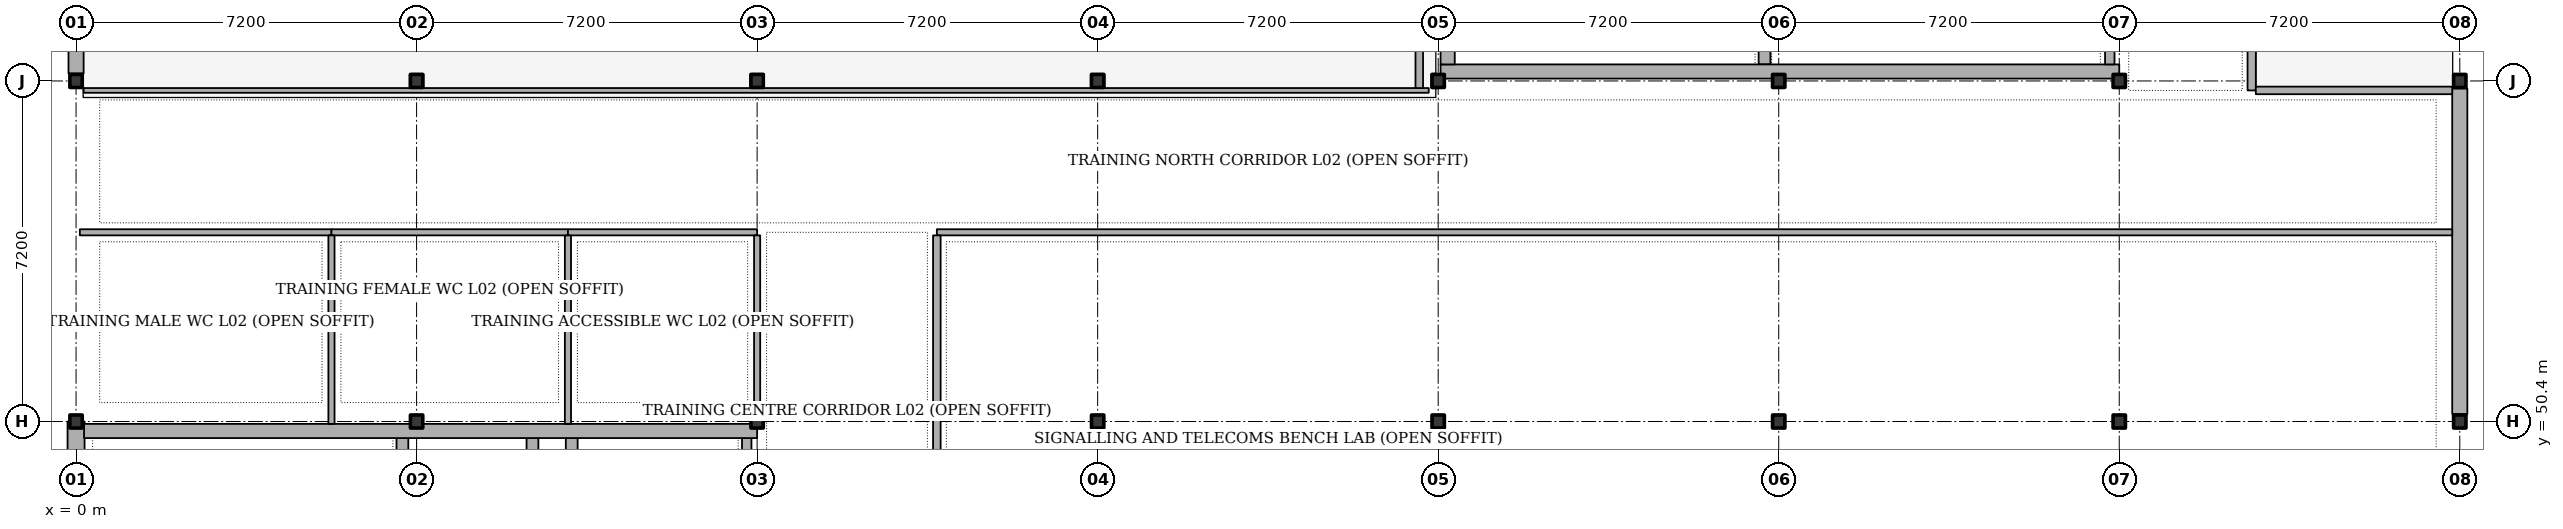
"""IFC4 building model, lengths in metres.
Left out: names, types, materials, properties, quantities, classifications, styles, units other than length and angle.
Written with IfcOpenShell. Run it as: python <this file> out.ifc"""

import sys

from ifc_helpers import new_model, si_unit, direction, frame, frame_2d, origin, origin_2d, place, context, subcontext, project, spatial, rectangle, i_section, extrude, element, fill, save


model = new_model("IFC4")
c1 = context("Model", 3, precision=1e-05, world=origin(), true_north=direction((0.0, 1.0)))
c2 = subcontext(c1, "Body", "Model", "MODEL_VIEW")
j1 = project(units=[si_unit("LENGTHUNIT", "METRE"), si_unit("PLANEANGLEUNIT", "RADIAN")], contexts=[c1])
p1 = place(None, origin())
s1 = spatial("IfcSite", under=j1, at=p1, CompositionType="ELEMENT")
p2 = place(p1, origin())
s2 = spatial("IfcBuilding", under=s1, at=p2, CompositionType="ELEMENT")
p3 = place(p2, frame((0.0, 0.0, 9.9)))
s3 = spatial("IfcBuildingStorey", under=s2, at=p3, CompositionType="ELEMENT", Elevation=9.9)
for number, where, z_axis, x_axis in (
    (1, (0.0, 50.4, 0.0), (0.0, 0.0, 1.0), (1.0, 0.0, 0.0)),
    (2, (0.0, 57.6, 0.0), (0.0, 0.0, 1.0), (1.0, 0.0, 0.0)),
    (3, (7.2, 50.4, 0.0), (0.0, 0.0, 1.0), (1.0, 0.0, 0.0)),
    (4, (7.2, 57.6, 0.0), (0.0, 0.0, 1.0), (1.0, 0.0, 0.0)),
    (5, (14.4, 50.4, 0.0), (0.0, 0.0, 1.0), (1.0, 0.0, 0.0)),
    (6, (14.4, 57.6, 0.0), (0.0, 0.0, 1.0), (1.0, 0.0, 0.0)),
    (7, (21.6, 50.4, 0.0), (0.0, 0.0, 1.0), (1.0, 0.0, 0.0)),
    (8, (21.6, 57.6, 0.0), (0.0, 0.0, 1.0), (1.0, 0.0, 0.0)),
    (9, (28.8, 50.4, 0.0), (0.0, 0.0, 1.0), (1.0, 0.0, 0.0)),
    (10, (28.8, 57.6, 0.0), (0.0, 0.0, 1.0), (1.0, 0.0, 0.0)),
    (11, (36.0, 50.4, 0.0), (0.0, 0.0, 1.0), (1.0, 0.0, 0.0)),
    (12, (36.0, 57.6, 0.0), (0.0, 0.0, 1.0), (1.0, 0.0, 0.0)),
    (13, (43.2, 50.4, 0.0), (0.0, 0.0, 1.0), (1.0, 0.0, 0.0)),
    (14, (43.2, 57.6, 0.0), (0.0, 0.0, 1.0), (1.0, 0.0, 0.0)),
    (15, (50.4, 50.4, 0.0), (0.0, 0.0, 1.0), (1.0, 0.0, 0.0)),
    (16, (50.4, 57.6, 0.0), (0.0, 0.0, 1.0), (1.0, 0.0, 0.0)),
):
    element("IfcColumn", number, at=place(p3, frame(where, z_axis=z_axis, x_axis=x_axis)), inside=s3, PredefinedType="COLUMN", context=c2, shape_type="SweptSolid", body=[
        extrude(i_section(OverallWidth=0.261, OverallDepth=0.276, WebThickness=0.015, FlangeThickness=0.025, FilletRadius=0.013, at=origin_2d()), origin(), (0.0, 0.0, 1.0), 4.5),
    ])
p4 = place(p3, frame((0.0, 43.2, 0.0), z_axis=(0.0, 0.0, 1.0), x_axis=(0.0, 1.0, 0.0)))
e17 = element("IfcWall", 17, at=p4, inside=s3, PredefinedType="SHEAR", context=c2, shape_type="SweptSolid", body=[
    extrude(rectangle(XDim=7.2, YDim=0.36, at=frame_2d((3.6, 0.0))), origin(), (0.0, 0.0, 1.0), 3.8),
])
p5 = place(p3, frame((0.0, 57.758, 0.0), z_axis=(0.0, 0.0, 1.0), x_axis=(0.0, 1.0, 0.0)))
e18 = element("IfcWall", 18, at=p5, inside=s3, PredefinedType="SOLIDWALL", context=c2, shape_type="SweptSolid", body=[
    extrude(rectangle(XDim=6.884, YDim=0.32, at=frame_2d((3.442, 0.0))), origin(), (0.0, 0.0, 1.0), 3.8),
])
p6 = place(p5, frame((3.042, 0.0, 1.05)))
e19 = element("IfcOpeningElement", 19, at=p6, cuts=e18, PredefinedType="OPENING", context=c2, shape_type="SweptSolid", body=[
    extrude(rectangle(XDim=0.8, YDim=1.4, at=frame_2d((0.4, 0.7))), frame((0.0, 0.17, 0.0), z_axis=(0.0, -1.0, 0.0), x_axis=(1.0, 0.0, 0.0)), (0.0, 0.0, 1.0), 0.34),
])
p7 = place(p3, frame((50.4, 57.442, 0.0), z_axis=(0.0, 0.0, 1.0), x_axis=(0.0, -1.0, 0.0)))
e20 = element("IfcWall", 20, at=p7, inside=s3, PredefinedType="SOLIDWALL", context=c2, shape_type="SweptSolid", body=[
    extrude(rectangle(XDim=6.884, YDim=0.32, at=frame_2d((3.442, 0.0))), origin(), (0.0, 0.0, 1.0), 3.414),
])
p8 = place(p7, frame((4.058, 0.0, 1.05)))
e21 = element("IfcOpeningElement", 21, at=p8, cuts=e20, PredefinedType="OPENING", context=c2, shape_type="SweptSolid", body=[
    extrude(rectangle(XDim=1.66, YDim=1.8, at=frame_2d((0.83, 0.9))), frame((0.0, 0.17, 0.0), z_axis=(0.0, -1.0, 0.0), x_axis=(1.0, 0.0, 0.0)), (0.0, 0.0, 1.0), 0.34),
])
p9 = place(p3, frame((6.9, 43.55, 0.0), z_axis=(0.0, 0.0, 1.0), x_axis=(0.0, 1.0, 0.0)))
e22 = element("IfcWall", 22, at=p9, inside=s3, PredefinedType="SHEAR", context=c2, shape_type="SweptSolid", body=[
    extrude(rectangle(XDim=6.5, YDim=0.25, at=frame_2d((3.25, 0.0))), origin(), (0.0, 0.0, 1.0), 3.6),
])
p10 = place(p9, frame((0.95, 0.0, 0.0)))
e23 = element("IfcOpeningElement", 23, at=p10, cuts=e22, PredefinedType="OPENING", context=c2, shape_type="SweptSolid", body=[
    extrude(rectangle(XDim=1.35, YDim=2.15, at=frame_2d((0.675, 1.075))), frame((0.0, 0.135, 0.0), z_axis=(0.0, -1.0, 0.0), x_axis=(1.0, 0.0, 0.0)), (0.0, 0.0, 1.0), 0.27),
])
p11 = place(p3, frame((9.65, 47.085, 0.0), z_axis=(0.0, 0.0, 1.0), x_axis=(0.0, 1.0, 0.0)))
e24 = element("IfcWall", 24, at=p11, inside=s3, PredefinedType="SHEAR", context=c2, shape_type="SweptSolid", body=[
    extrude(rectangle(XDim=2.965, YDim=0.25, at=frame_2d((1.482, 0.0))), origin(), (0.0, 0.0, 1.0), 3.6),
])
p12 = place(p3, frame((10.48, 47.085, 0.0), z_axis=(0.0, 0.0, 1.0), x_axis=(0.0, 1.0, 0.0)))
e25 = element("IfcWall", 25, at=p12, inside=s3, PredefinedType="SHEAR", context=c2, shape_type="SweptSolid", body=[
    extrude(rectangle(XDim=2.965, YDim=0.25, at=frame_2d((1.482, 0.0))), origin(), (0.0, 0.0, 1.0), 3.6),
])
p13 = place(p12, frame((0.9, 0.0, 0.0)))
e26 = element("IfcOpeningElement", 26, at=p13, cuts=e25, PredefinedType="OPENING", context=c2, shape_type="SweptSolid", body=[
    extrude(rectangle(XDim=0.92, YDim=2.05, at=frame_2d((0.46, 1.025))), frame((0.0, 0.135, 0.0), z_axis=(0.0, -1.0, 0.0), x_axis=(1.0, 0.0, 0.0)), (0.0, 0.0, 1.0), 0.27),
])
p14 = place(p3, frame((14.18, 43.55, 0.0), z_axis=(0.0, 0.0, 1.0), x_axis=(0.0, 1.0, 0.0)))
e27 = element("IfcWall", 27, at=p14, inside=s3, PredefinedType="SOLIDWALL", context=c2, shape_type="SweptSolid", body=[
    extrude(rectangle(XDim=6.5, YDim=0.2, at=frame_2d((3.25, 0.0))), origin(), (0.0, 0.0, 1.0), 3.6),
])
p15 = place(p14, frame((2.5, 0.0, 0.0)))
e28 = element("IfcOpeningElement", 28, at=p15, cuts=e27, PredefinedType="OPENING", context=c2, shape_type="SweptSolid", body=[
    extrude(rectangle(XDim=1.5, YDim=2.15, at=frame_2d((0.75, 1.075))), frame((0.0, 0.11, 0.0), z_axis=(0.0, -1.0, 0.0), x_axis=(1.0, 0.0, 0.0)), (0.0, 0.0, 1.0), 0.22),
])
p16 = place(p3, frame((0.17, 50.2, 0.0), z_axis=(0.0, 0.0, 1.0), x_axis=(1.0, 0.0, 0.0)))
e29 = element("IfcWall", 29, at=p16, inside=s3, PredefinedType="SHEAR", context=c2, shape_type="SweptSolid", body=[
    extrude(rectangle(XDim=14.23, YDim=0.3, at=frame_2d((7.115, 0.0))), origin(), (0.0, 0.0, 1.0), 3.6),
])
p17 = place(p3, frame((35.7, 57.95, 0.0), z_axis=(0.0, 0.0, 1.0), x_axis=(0.0, 1.0, 0.0)))
e30 = element("IfcWall", 30, at=p17, inside=s3, PredefinedType="SHEAR", context=c2, shape_type="SweptSolid", body=[
    extrude(rectangle(XDim=6.5, YDim=0.25, at=frame_2d((3.25, 0.0))), origin(), (0.0, 0.0, 1.0), 3.6),
])
p18 = place(p17, frame((0.95, 0.0, 0.0)))
e31 = element("IfcOpeningElement", 31, at=p18, cuts=e30, PredefinedType="OPENING", context=c2, shape_type="SweptSolid", body=[
    extrude(rectangle(XDim=1.35, YDim=2.15, at=frame_2d((0.675, 1.075))), frame((0.0, 0.135, 0.0), z_axis=(0.0, -1.0, 0.0), x_axis=(1.0, 0.0, 0.0)), (0.0, 0.0, 1.0), 0.27),
])
p19 = place(p3, frame((28.85, 57.8, 0.0), z_axis=(0.0, 0.0, 1.0), x_axis=(1.0, 0.0, 0.0)))
e32 = element("IfcWall", 32, at=p19, inside=s3, PredefinedType="SHEAR", context=c2, shape_type="SweptSolid", body=[
    extrude(rectangle(XDim=14.35, YDim=0.3, at=frame_2d((7.175, 0.0))), origin(), (0.0, 0.0, 1.0), 3.6),
])
p20 = place(p19, frame((11.5, 0.0, 0.0)))
e33 = element("IfcOpeningElement", 33, at=p20, cuts=e32, PredefinedType="OPENING", context=c2, shape_type="SweptSolid", body=[
    extrude(rectangle(XDim=1.5, YDim=2.15, at=frame_2d((0.75, 1.075))), frame((0.0, 0.16, 0.0), z_axis=(0.0, -1.0, 0.0), x_axis=(1.0, 0.0, 0.0)), (0.0, 0.0, 1.0), 0.32),
])
p21 = place(p3, frame((29.0, 57.95, 0.0), z_axis=(0.0, 0.0, 1.0), x_axis=(0.0, 1.0, 0.0)))
e34 = element("IfcWall", 34, at=p21, inside=s3, PredefinedType="SHEAR", context=c2, shape_type="SweptSolid", body=[
    extrude(rectangle(XDim=6.5, YDim=0.3, at=frame_2d((3.25, 0.0))), origin(), (0.0, 0.0, 1.0), 3.6),
])
p22 = place(p3, frame((43.0, 57.95, 0.0), z_axis=(0.0, 0.0, 1.0), x_axis=(0.0, 1.0, 0.0)))
e35 = element("IfcWall", 35, at=p22, inside=s3, PredefinedType="SOLIDWALL", context=c2, shape_type="SweptSolid", body=[
    extrude(rectangle(XDim=6.5, YDim=0.2, at=frame_2d((3.25, 0.0))), origin(), (0.0, 0.0, 1.0), 3.6),
])
p23 = place(p3, frame((18.2, 54.4, 0.0), z_axis=(0.0, 0.0, 1.0), x_axis=(1.0, 0.0, 0.0)))
e36 = element("IfcWall", 36, at=p23, inside=s3, PredefinedType="PARTITIONING", context=c2, shape_type="SweptSolid", body=[
    extrude(rectangle(XDim=32.04, YDim=0.13, at=frame_2d((16.02, 0.0))), origin(), (0.0, 0.0, 1.0), 3.55),
])
p24 = place(p23, frame((0.32, 0.0, 0.0)))
e37 = element("IfcOpeningElement", 37, at=p24, cuts=e36, PredefinedType="OPENING", context=c2, shape_type="SweptSolid", body=[
    extrude(rectangle(XDim=1.75, YDim=2.25, at=frame_2d((0.875, 1.125))), frame((0.0, 0.075, 0.0), z_axis=(0.0, -1.0, 0.0), x_axis=(1.0, 0.0, 0.0)), (0.0, 0.0, 1.0), 0.15),
])
p25 = place(p3, frame((0.08, 54.4, 0.0), z_axis=(0.0, 0.0, 1.0), x_axis=(1.0, 0.0, 0.0)))
e38 = element("IfcWall", 38, at=p25, inside=s3, PredefinedType="PARTITIONING", context=c2, shape_type="SweptSolid", body=[
    extrude(rectangle(XDim=5.32, YDim=0.13, at=frame_2d((2.66, 0.0))), origin(), (0.0, 0.0, 1.0), 3.55),
])
p26 = place(p25, frame((3.21, 0.0, 0.0)))
e39 = element("IfcOpeningElement", 39, at=p26, cuts=e38, PredefinedType="OPENING", context=c2, shape_type="SweptSolid", body=[
    extrude(rectangle(XDim=0.9, YDim=2.05, at=frame_2d((0.45, 1.025))), frame((0.0, 0.075, 0.0), z_axis=(0.0, -1.0, 0.0), x_axis=(1.0, 0.0, 0.0)), (0.0, 0.0, 1.0), 0.15),
])
p27 = place(p3, frame((5.4, 54.4, 0.0), z_axis=(0.0, 0.0, 1.0), x_axis=(1.0, 0.0, 0.0)))
e40 = element("IfcWall", 40, at=p27, inside=s3, PredefinedType="PARTITIONING", context=c2, shape_type="SweptSolid", body=[
    extrude(rectangle(XDim=5.0, YDim=0.13, at=frame_2d((2.5, 0.0))), origin(), (0.0, 0.0, 1.0), 3.55),
])
p28 = place(p27, frame((3.78, 0.0, 0.0)))
e41 = element("IfcOpeningElement", 41, at=p28, cuts=e40, PredefinedType="OPENING", context=c2, shape_type="SweptSolid", body=[
    extrude(rectangle(XDim=0.9, YDim=2.05, at=frame_2d((0.45, 1.025))), frame((0.0, 0.075, 0.0), z_axis=(0.0, -1.0, 0.0), x_axis=(1.0, 0.0, 0.0)), (0.0, 0.0, 1.0), 0.15),
])
p29 = place(p3, frame((10.4, 54.4, 0.0), z_axis=(0.0, 0.0, 1.0), x_axis=(1.0, 0.0, 0.0)))
e42 = element("IfcWall", 42, at=p29, inside=s3, PredefinedType="PARTITIONING", context=c2, shape_type="SweptSolid", body=[
    extrude(rectangle(XDim=4.0, YDim=0.13, at=frame_2d((2.0, 0.0))), origin(), (0.0, 0.0, 1.0), 3.55),
])
p30 = place(p29, frame((0.32, 0.0, 0.0)))
e43 = element("IfcOpeningElement", 43, at=p30, cuts=e42, PredefinedType="OPENING", context=c2, shape_type="SweptSolid", body=[
    extrude(rectangle(XDim=0.98, YDim=2.1, at=frame_2d((0.49, 1.05))), frame((0.0, 0.075, 0.0), z_axis=(0.0, -1.0, 0.0), x_axis=(1.0, 0.0, 0.0)), (0.0, 0.0, 1.0), 0.15),
])
p31 = place(p3, frame((0.16, 57.4, 0.0), z_axis=(0.0, 0.0, 1.0), x_axis=(1.0, 0.0, 0.0)))
e44 = element("IfcWall", 44, at=p31, inside=s3, PredefinedType="PARTITIONING", context=c2, shape_type="SweptSolid", body=[
    extrude(rectangle(XDim=28.44, YDim=0.1, at=frame_2d((14.22, 0.0))), origin(), (0.0, 0.0, 1.0), 3.55),
])
p32 = place(p31, frame((16.947, 0.0, 0.0)))
e45 = element("IfcOpeningElement", 45, at=p32, cuts=e44, PredefinedType="OPENING", context=c2, shape_type="SweptSolid", body=[
    extrude(rectangle(XDim=1.28, YDim=2.18, at=frame_2d((0.64, 1.09))), frame((0.0, 0.06, 0.0), z_axis=(0.0, -1.0, 0.0), x_axis=(1.0, 0.0, 0.0)), (0.0, 0.0, 1.0), 0.12),
])
p33 = place(p3, frame((46.0, 57.4, 0.0), z_axis=(0.0, 0.0, 1.0), x_axis=(0.0, 1.0, 0.0)))
e46 = element("IfcWall", 46, at=p33, inside=s3, PredefinedType="PARTITIONING", context=c2, shape_type="SweptSolid", body=[
    extrude(rectangle(XDim=14.44, YDim=0.175, at=frame_2d((7.22, 0.0))), origin(), (0.0, 0.0, 1.0), 3.55),
])
p34 = place(p33, frame((3.275, 0.0, 0.0)))
e47 = element("IfcOpeningElement", 47, at=p34, cuts=e46, PredefinedType="OPENING", context=c2, shape_type="SweptSolid", body=[
    extrude(rectangle(XDim=1.05, YDim=2.15, at=frame_2d((0.525, 1.075))), frame((0.0, 0.097, 0.0), z_axis=(0.0, -1.0, 0.0), x_axis=(1.0, 0.0, 0.0)), (0.0, 0.0, 1.0), 0.195),
])
p35 = place(p3, frame((18.2, 38.28, 0.0), z_axis=(0.0, 0.0, 1.0), x_axis=(0.0, 1.0, 0.0)))
e48 = element("IfcWall", 48, at=p35, inside=s3, PredefinedType="PARTITIONING", context=c2, shape_type="SweptSolid", body=[
    extrude(rectangle(XDim=16.055, YDim=0.16, at=frame_2d((8.027, 0.0))), origin(), (0.0, 0.0, 1.0), 3.55),
])
for number, where, z_axis, x_axis in (
    (49, (5.4, 50.35, 0.0), (0.0, 0.0, 1.0), (0.0, 1.0, 0.0)),
    (50, (10.4, 50.35, 0.0), (0.0, 0.0, 1.0), (0.0, 1.0, 0.0)),
):
    element("IfcWall", number, at=place(p3, frame(where, z_axis=z_axis, x_axis=x_axis)), inside=s3, PredefinedType="PARTITIONING", context=c2, shape_type="SweptSolid", body=[
        extrude(rectangle(XDim=3.985, YDim=0.13, at=frame_2d((1.992, 0.0))), origin(), (0.0, 0.0, 1.0), 3.55),
    ])
p36 = place(p3, frame((14.4, 50.54, 0.0), z_axis=(0.0, 0.0, 1.0), x_axis=(0.0, 1.0, 0.0)))
e51 = element("IfcWall", 51, at=p36, inside=s3, PredefinedType="PARTITIONING", context=c2, shape_type="SweptSolid", body=[
    extrude(rectangle(XDim=3.795, YDim=0.13, at=frame_2d((1.897, 0.0))), origin(), (0.0, 0.0, 1.0), 3.55),
])
p37 = place(p3, frame((28.4, 57.45, 0.0), z_axis=(0.0, 0.0, 1.0), x_axis=(0.0, 1.0, 0.0)))
e52 = element("IfcWall", 52, at=p37, inside=s3, PredefinedType="PARTITIONING", context=c2, shape_type="SweptSolid", body=[
    extrude(rectangle(XDim=14.47, YDim=0.16, at=frame_2d((7.235, 0.0))), origin(), (0.0, 0.0, 1.0), 3.404),
])
p38 = place(p3, frame((46.087, 57.4, 0.0), z_axis=(0.0, 0.0, 1.0), x_axis=(1.0, 0.0, 0.0)))
e53 = element("IfcWall", 53, at=p38, inside=s3, PredefinedType="PARTITIONING", context=c2, shape_type="SweptSolid", body=[
    extrude(rectangle(XDim=4.153, YDim=0.16, at=frame_2d((2.077, 0.0))), origin(), (0.0, 0.0, 1.0), 3.55),
])
p39 = place(p8, origin())
e54 = element("IfcWindow", 54, at=p39, inside=s3, PartitioningType="SINGLE_PANEL", PredefinedType="WINDOW", context=c2, shape_type="SweptSolid", body=[
    extrude(rectangle(XDim=1.66, YDim=1.8, at=frame_2d((0.83, 0.9))), frame((0.0, 0.03, 0.0), z_axis=(0.0, -1.0, 0.0), x_axis=(1.0, 0.0, 0.0)), (0.0, 0.0, 1.0), 0.06),
])
fill(e21, e54)
p40 = place(p20, origin())
e55 = element("IfcDoor", 55, at=p40, inside=s3, OperationType="SINGLE_SWING_RIGHT", PredefinedType="DOOR", context=c2, shape_type="SweptSolid", body=[
    extrude(rectangle(XDim=1.5, YDim=2.15, at=frame_2d((0.75, 1.075))), frame((0.0, 0.025, 0.0), z_axis=(0.0, -1.0, 0.0), x_axis=(1.0, 0.0, 0.0)), (0.0, 0.0, 1.0), 0.05),
])
fill(e33, e55)
p41 = place(p24, origin())
e56 = element("IfcDoor", 56, at=p41, inside=s3, OperationType="DOUBLE_SWING_LEFT", PredefinedType="DOOR", context=c2, shape_type="SweptSolid", body=[
    extrude(rectangle(XDim=1.75, YDim=2.25, at=frame_2d((0.875, 1.125))), frame((0.0, 0.025, 0.0), z_axis=(0.0, -1.0, 0.0), x_axis=(1.0, 0.0, 0.0)), (0.0, 0.0, 1.0), 0.05),
])
fill(e37, e56)
p42 = place(p26, origin())
e57 = element("IfcDoor", 57, at=p42, inside=s3, OperationType="SINGLE_SWING_LEFT", PredefinedType="DOOR", context=c2, shape_type="SweptSolid", body=[
    extrude(rectangle(XDim=0.9, YDim=2.05, at=frame_2d((0.45, 1.025))), frame((0.0, 0.025, 0.0), z_axis=(0.0, -1.0, 0.0), x_axis=(1.0, 0.0, 0.0)), (0.0, 0.0, 1.0), 0.05),
])
fill(e39, e57)
p43 = place(p28, origin())
e58 = element("IfcDoor", 58, at=p43, inside=s3, OperationType="SINGLE_SWING_RIGHT", PredefinedType="DOOR", context=c2, shape_type="SweptSolid", body=[
    extrude(rectangle(XDim=0.9, YDim=2.05, at=frame_2d((0.45, 1.025))), frame((0.0, 0.025, 0.0), z_axis=(0.0, -1.0, 0.0), x_axis=(1.0, 0.0, 0.0)), (0.0, 0.0, 1.0), 0.05),
])
fill(e41, e58)
p44 = place(p30, origin())
e59 = element("IfcDoor", 59, at=p44, inside=s3, OperationType="SINGLE_SWING_LEFT", PredefinedType="DOOR", context=c2, shape_type="SweptSolid", body=[
    extrude(rectangle(XDim=0.98, YDim=2.1, at=frame_2d((0.49, 1.05))), frame((0.0, 0.025, 0.0), z_axis=(0.0, -1.0, 0.0), x_axis=(1.0, 0.0, 0.0)), (0.0, 0.0, 1.0), 0.05),
])
fill(e43, e59)
p45 = place(p32, origin())
e60 = element("IfcDoor", 60, at=p45, inside=s3, OperationType="SINGLE_SWING_RIGHT", PredefinedType="DOOR", context=c2, shape_type="SweptSolid", body=[
    extrude(rectangle(XDim=1.28, YDim=2.18, at=frame_2d((0.64, 1.09))), frame((0.0, 0.025, 0.0), z_axis=(0.0, -1.0, 0.0), x_axis=(1.0, 0.0, 0.0)), (0.0, 0.0, 1.0), 0.05),
])
fill(e45, e60)
save(model, sys.argv[1])
